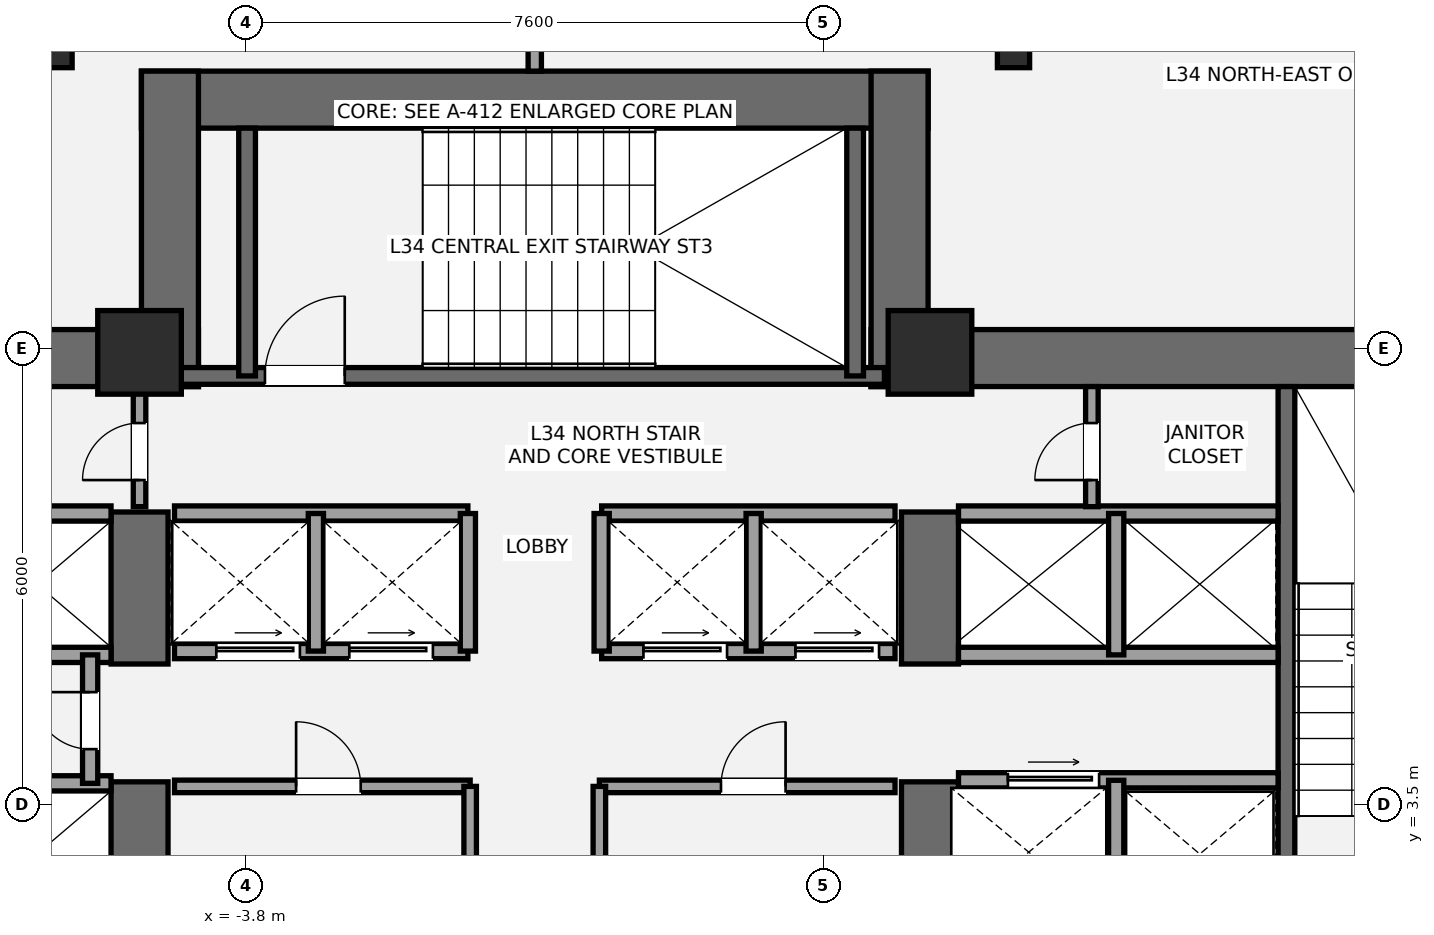
"""IFC4 building model, lengths in metres.
Left out: names, types, materials, properties, quantities, classifications, styles, units other than length and angle.
Written with IfcOpenShell. Run it as: python <this file> out.ifc"""

import sys

from ifc_helpers import new_model, si_unit, direction, frame, frame_2d, origin, origin_2d, place, context, subcontext, project, spatial, rectangle, i_section, extrude, element, fill, save


model = new_model("IFC4")
c1 = context("Model", 3, precision=1e-05, world=origin(), true_north=direction((0.0, 1.0)))
c2 = subcontext(c1, "Body", "Model", "MODEL_VIEW")
j1 = project(units=[si_unit("LENGTHUNIT", "METRE"), si_unit("PLANEANGLEUNIT", "RADIAN")], contexts=[c1])
p1 = place(None, origin())
s1 = spatial("IfcSite", under=j1, at=p1, CompositionType="ELEMENT")
p2 = place(p1, origin())
s2 = spatial("IfcBuilding", under=s1, at=p2, CompositionType="ELEMENT")
p3 = place(p2, frame((0.0, 0.0, 128.1)))
s3 = spatial("IfcBuildingStorey", under=s2, at=p3, CompositionType="ELEMENT", Elevation=128.1)
p4 = place(p3, frame((-13.9, 9.375, 0.0), z_axis=(0.0, 0.0, 1.0), x_axis=(1.0, 0.0, 0.0)))
e1 = element("IfcWall", 1, at=p4, inside=s3, PredefinedType="SHEAR", context=c2, shape_type="SweptSolid", body=[
    extrude(rectangle(XDim=9.475, YDim=0.75, at=frame_2d((4.737, 0.0))), origin(), (0.0, 0.0, 1.0), 3.5),
])
p5 = place(p3, frame((-5.2, 1.1, 0.0), z_axis=(0.0, 0.0, 1.0), x_axis=(0.0, 1.0, 0.0)))
e2 = element("IfcWall", 2, at=p5, inside=s3, PredefinedType="SHEAR", context=c2, shape_type="SweptSolid", body=[
    extrude(rectangle(XDim=2.7, YDim=0.75, at=frame_2d((1.35, 0.0))), origin(), (0.0, 0.0, 1.0), 3.5),
])
p6 = place(p3, frame((-5.2, 5.35, 0.0), z_axis=(0.0, 0.0, 1.0), x_axis=(0.0, 1.0, 0.0)))
e3 = element("IfcWall", 3, at=p6, inside=s3, PredefinedType="SHEAR", context=c2, shape_type="SweptSolid", body=[
    extrude(rectangle(XDim=2.0, YDim=0.75, at=frame_2d((1.0, 0.0))), origin(), (0.0, 0.0, 1.0), 3.5),
])
p7 = place(p3, frame((4.425, 9.375, 0.0), z_axis=(0.0, 0.0, 1.0), x_axis=(1.0, 0.0, 0.0)))
e4 = element("IfcWall", 4, at=p7, inside=s3, PredefinedType="SHEAR", context=c2, shape_type="SweptSolid", body=[
    extrude(rectangle(XDim=9.475, YDim=0.75, at=frame_2d((4.737, 0.0))), origin(), (0.0, 0.0, 1.0), 3.5),
])
p8 = place(p3, frame((5.2, 1.1, 0.0), z_axis=(0.0, 0.0, 1.0), x_axis=(0.0, 1.0, 0.0)))
e5 = element("IfcWall", 5, at=p8, inside=s3, PredefinedType="SHEAR", context=c2, shape_type="SweptSolid", body=[
    extrude(rectangle(XDim=2.7, YDim=0.75, at=frame_2d((1.35, 0.0))), origin(), (0.0, 0.0, 1.0), 3.5),
])
p9 = place(p3, frame((5.2, 5.35, 0.0), z_axis=(0.0, 0.0, 1.0), x_axis=(0.0, 1.0, 0.0)))
e6 = element("IfcWall", 6, at=p9, inside=s3, PredefinedType="SHEAR", context=c2, shape_type="SweptSolid", body=[
    extrude(rectangle(XDim=2.0, YDim=0.75, at=frame_2d((1.0, 0.0))), origin(), (0.0, 0.0, 1.0), 3.5),
])
p10 = place(p3, frame((9.89, 1.85, 0.0), z_axis=(0.0, 0.0, 1.0), x_axis=(0.0, 1.0, 0.0)))
e7 = element("IfcWall", 7, at=p10, inside=s3, PredefinedType="SHEAR", context=c2, shape_type="SweptSolid", body=[
    extrude(rectangle(XDim=7.15, YDim=0.22, at=frame_2d((3.575, 0.0))), origin(), (0.0, 0.0, 1.0), 3.5),
])
p11 = place(p3, frame((-5.175, 12.775, 0.0), z_axis=(0.0, 0.0, 1.0), x_axis=(1.0, 0.0, 0.0)))
e8 = element("IfcWall", 8, at=p11, inside=s3, PredefinedType="SHEAR", context=c2, shape_type="SweptSolid", body=[
    extrude(rectangle(XDim=10.35, YDim=0.75, at=frame_2d((5.175, 0.0))), origin(), (0.0, 0.0, 1.0), 3.5),
])
for number, where, z_axis, x_axis in (
    (9, (-4.8, 9.0, 0.0), (0.0, 0.0, 1.0), (0.0, 1.0, 0.0)),
    (10, (4.8, 9.0, 0.0), (0.0, 0.0, 1.0), (0.0, 1.0, 0.0)),
):
    element("IfcWall", number, at=place(p3, frame(where, z_axis=z_axis, x_axis=x_axis)), inside=s3, PredefinedType="SHEAR", context=c2, shape_type="SweptSolid", body=[
        extrude(rectangle(XDim=4.15, YDim=0.75, at=frame_2d((2.075, 0.0))), origin(), (0.0, 0.0, 1.0), 3.5),
    ])
p12 = place(p3, frame((-4.7, 9.14, 0.0), z_axis=(0.0, 0.0, 1.0), x_axis=(1.0, 0.0, 0.0)))
e11 = element("IfcWall", 11, at=p12, inside=s3, PredefinedType="SHEAR", context=c2, shape_type="SweptSolid", body=[
    extrude(rectangle(XDim=9.3, YDim=0.22, at=frame_2d((4.65, 0.0))), origin(), (0.0, 0.0, 1.0), 3.5),
])
p13 = place(p12, frame((1.15, 0.0, 0.0)))
e12 = element("IfcOpeningElement", 12, at=p13, cuts=e11, PredefinedType="OPENING", context=c2, shape_type="SweptSolid", body=[
    extrude(rectangle(XDim=1.05, YDim=2.15, at=frame_2d((0.525, 1.075))), frame((0.0, 0.12, 0.0), z_axis=(0.0, -1.0, 0.0), x_axis=(1.0, 0.0, 0.0)), (0.0, 0.0, 1.0), 0.24),
])
for number, where, z_axis, x_axis in (
    (13, (-3.785, 9.14, 0.0), (0.0, 0.0, 1.0), (0.0, 1.0, 0.0)),
    (14, (4.215, 9.14, 0.0), (0.0, 0.0, 1.0), (0.0, 1.0, 0.0)),
):
    element("IfcWall", number, at=place(p3, frame(where, z_axis=z_axis, x_axis=x_axis)), inside=s3, PredefinedType="SHEAR", context=c2, shape_type="SweptSolid", body=[
        extrude(rectangle(XDim=3.26, YDim=0.22, at=frame_2d((1.63, 0.0))), origin(), (0.0, 0.0, 1.0), 3.5),
    ])
for number, where, z_axis, x_axis in (
    (15, (-5.2, 9.45, 0.0), (0.0, 0.0, 1.0), (1.0, 0.0, 0.0)),
    (16, (5.2, 9.45, 0.0), (0.0, 0.0, 1.0), (1.0, 0.0, 0.0)),
):
    element("IfcColumn", number, at=place(p3, frame(where, z_axis=z_axis, x_axis=x_axis)), inside=s3, PredefinedType="COLUMN", context=c2, shape_type="SweptSolid", body=[
        extrude(rectangle(XDim=1.1, YDim=1.1, at=origin_2d()), origin(), (0.0, 0.0, 1.0), 3.5),
    ])
for number, where, z_axis, x_axis in (
    (17, (6.299, 13.433, 0.0), (0.0, 0.0, 1.0), (1.0, 0.0, 0.0)),
    (18, (-6.299, 13.433, 0.0), (0.0, 0.0, 1.0), (1.0, 0.0, 0.0)),
):
    element("IfcColumn", number, at=place(p3, frame(where, z_axis=z_axis, x_axis=x_axis)), inside=s3, PredefinedType="COLUMN", context=c2, shape_type="SweptSolid", body=[
        extrude(i_section(OverallWidth=0.424, OverallDepth=0.474, WebThickness=0.048, FlangeThickness=0.077, at=origin_2d()), origin(), (0.0, 0.0, 1.0), 3.5),
    ])
for number, where, z_axis, x_axis in (
    (19, (-9.78, 3.78, 0.0), (0.0, 0.0, 1.0), (1.0, 0.0, 0.0)),
    (20, (-9.78, 5.47, 0.0), (0.0, 0.0, 1.0), (1.0, 0.0, 0.0)),
    (21, (-9.78, 7.33, 0.0), (0.0, 0.0, 1.0), (1.0, 0.0, 0.0)),
):
    element("IfcWall", number, at=place(p3, frame(where, z_axis=z_axis, x_axis=x_axis)), inside=s3, PredefinedType="SOLIDWALL", context=c2, shape_type="SweptSolid", body=[
        extrude(rectangle(XDim=4.205, YDim=0.2, at=frame_2d((2.103, 0.0))), origin(), (0.0, 0.0, 1.0), 3.31),
    ])
p14 = place(p3, frame((-5.85, 3.78, 0.0), z_axis=(0.0, 0.0, 1.0), x_axis=(0.0, 1.0, 0.0)))
e22 = element("IfcWall", 22, at=p14, inside=s3, PredefinedType="SOLIDWALL", context=c2, shape_type="SweptSolid", body=[
    extrude(rectangle(XDim=1.69, YDim=0.2, at=frame_2d((0.845, 0.0))), origin(), (0.0, 0.0, 1.0), 3.31),
])
p15 = place(p14, frame((0.45, 0.0, 0.0)))
e23 = element("IfcOpeningElement", 23, at=p15, cuts=e22, PredefinedType="OPENING", context=c2, shape_type="SweptSolid", body=[
    extrude(rectangle(XDim=0.75, YDim=2.1, at=frame_2d((0.375, 1.05))), frame((0.0, 0.11, 0.0), z_axis=(0.0, -1.0, 0.0), x_axis=(1.0, 0.0, 0.0)), (0.0, 0.0, 1.0), 0.22),
])
p16 = place(p3, frame((5.575, 3.82, 0.0), z_axis=(0.0, 0.0, 1.0), x_axis=(1.0, 0.0, 0.0)))
e24 = element("IfcWall", 24, at=p16, inside=s3, PredefinedType="SOLIDWALL", context=c2, shape_type="SweptSolid", body=[
    extrude(rectangle(XDim=4.205, YDim=0.2, at=frame_2d((2.103, 0.0))), origin(), (0.0, 0.0, 1.0), 3.31),
])
p17 = place(p16, frame((0.65, 0.0, 0.0)))
e25 = element("IfcOpeningElement", 25, at=p17, cuts=e24, PredefinedType="OPENING", context=c2, shape_type="SweptSolid", body=[
    extrude(rectangle(XDim=1.2, YDim=2.2, at=frame_2d((0.6, 1.1))), frame((0.0, 0.11, 0.0), z_axis=(0.0, -1.0, 0.0), x_axis=(1.0, 0.0, 0.0)), (0.0, 0.0, 1.0), 0.22),
])
p18 = place(p3, frame((7.65, 1.85, 0.0), z_axis=(0.0, 0.0, 1.0), x_axis=(0.0, 1.0, 0.0)))
e26 = element("IfcWall", 26, at=p18, inside=s3, PredefinedType="SOLIDWALL", context=c2, shape_type="SweptSolid", body=[
    extrude(rectangle(XDim=1.97, YDim=0.2, at=frame_2d((0.985, 0.0))), origin(), (0.0, 0.0, 1.0), 3.31),
])
for number, where, z_axis, x_axis in (
    (27, (5.575, 5.47, 0.0), (0.0, 0.0, 1.0), (1.0, 0.0, 0.0)),
    (28, (5.575, 7.33, 0.0), (0.0, 0.0, 1.0), (1.0, 0.0, 0.0)),
):
    element("IfcWall", number, at=place(p3, frame(where, z_axis=z_axis, x_axis=x_axis)), inside=s3, PredefinedType="SOLIDWALL", context=c2, shape_type="SweptSolid", body=[
        extrude(rectangle(XDim=4.205, YDim=0.2, at=frame_2d((2.103, 0.0))), origin(), (0.0, 0.0, 1.0), 3.31),
    ])
p19 = place(p3, frame((7.65, 5.47, 0.0), z_axis=(0.0, 0.0, 1.0), x_axis=(0.0, 1.0, 0.0)))
e29 = element("IfcWall", 29, at=p19, inside=s3, PredefinedType="SOLIDWALL", context=c2, shape_type="SweptSolid", body=[
    extrude(rectangle(XDim=1.86, YDim=0.2, at=frame_2d((0.93, 0.0))), origin(), (0.0, 0.0, 1.0), 3.31),
])
p20 = place(p3, frame((-4.74, 3.74, 0.0), z_axis=(0.0, 0.0, 1.0), x_axis=(1.0, 0.0, 0.0)))
e30 = element("IfcWall", 30, at=p20, inside=s3, PredefinedType="PARTITIONING", context=c2, shape_type="SweptSolid", body=[
    extrude(rectangle(XDim=3.89, YDim=0.165, at=frame_2d((1.945, 0.0))), origin(), (0.0, 0.0, 1.0), 3.31),
])
p21 = place(p20, frame((1.6, 0.0, 0.0)))
e31 = element("IfcOpeningElement", 31, at=p21, cuts=e30, PredefinedType="OPENING", context=c2, shape_type="SweptSolid", body=[
    extrude(rectangle(XDim=0.85, YDim=2.1, at=frame_2d((0.425, 1.05))), frame((0.0, 0.093, 0.0), z_axis=(0.0, -1.0, 0.0), x_axis=(1.0, 0.0, 0.0)), (0.0, 0.0, 1.0), 0.185),
])
p22 = place(p3, frame((-0.85, 1.92, 0.0), z_axis=(0.0, 0.0, 1.0), x_axis=(0.0, 1.0, 0.0)))
e32 = element("IfcWall", 32, at=p22, inside=s3, PredefinedType="PARTITIONING", context=c2, shape_type="SweptSolid", body=[
    extrude(rectangle(XDim=1.82, YDim=0.165, at=frame_2d((0.91, 0.0))), origin(), (0.0, 0.0, 1.0), 3.31),
])
p23 = place(p3, frame((0.85, 3.74, 0.0), z_axis=(0.0, 0.0, 1.0), x_axis=(1.0, 0.0, 0.0)))
e33 = element("IfcWall", 33, at=p23, inside=s3, PredefinedType="PARTITIONING", context=c2, shape_type="SweptSolid", body=[
    extrude(rectangle(XDim=3.89, YDim=0.165, at=frame_2d((1.945, 0.0))), origin(), (0.0, 0.0, 1.0), 3.31),
])
p24 = place(p23, frame((1.6, 0.0, 0.0)))
e34 = element("IfcOpeningElement", 34, at=p24, cuts=e33, PredefinedType="OPENING", context=c2, shape_type="SweptSolid", body=[
    extrude(rectangle(XDim=0.85, YDim=2.1, at=frame_2d((0.425, 1.05))), frame((0.0, 0.093, 0.0), z_axis=(0.0, -1.0, 0.0), x_axis=(1.0, 0.0, 0.0)), (0.0, 0.0, 1.0), 0.185),
])
p25 = place(p3, frame((0.85, 1.92, 0.0), z_axis=(0.0, 0.0, 1.0), x_axis=(0.0, 1.0, 0.0)))
e35 = element("IfcWall", 35, at=p25, inside=s3, PredefinedType="PARTITIONING", context=c2, shape_type="SweptSolid", body=[
    extrude(rectangle(XDim=1.82, YDim=0.165, at=frame_2d((0.91, 0.0))), origin(), (0.0, 0.0, 1.0), 3.31),
])
p26 = place(p3, frame((-4.74, 5.52, 0.0), z_axis=(0.0, 0.0, 1.0), x_axis=(1.0, 0.0, 0.0)))
e36 = element("IfcWall", 36, at=p26, inside=s3, PredefinedType="SOLIDWALL", context=c2, shape_type="SweptSolid", body=[
    extrude(rectangle(XDim=3.86, YDim=0.2, at=frame_2d((1.93, 0.0))), origin(), (0.0, 0.0, 1.0), 3.31),
])
p27 = place(p26, frame((0.55, 0.0, 0.0)))
e37 = element("IfcOpeningElement", 37, at=p27, cuts=e36, PredefinedType="OPENING", context=c2, shape_type="SweptSolid", body=[
    extrude(rectangle(XDim=1.1, YDim=2.2, at=frame_2d((0.55, 1.1))), frame((0.0, 0.11, 0.0), z_axis=(0.0, -1.0, 0.0), x_axis=(1.0, 0.0, 0.0)), (0.0, 0.0, 1.0), 0.22),
])
p28 = place(p26, frame((2.3, 0.0, 0.0)))
e38 = element("IfcOpeningElement", 38, at=p28, cuts=e36, PredefinedType="OPENING", context=c2, shape_type="SweptSolid", body=[
    extrude(rectangle(XDim=1.1, YDim=2.2, at=frame_2d((0.55, 1.1))), frame((0.0, 0.11, 0.0), z_axis=(0.0, -1.0, 0.0), x_axis=(1.0, 0.0, 0.0)), (0.0, 0.0, 1.0), 0.22),
])
p29 = place(p3, frame((0.88, 5.52, 0.0), z_axis=(0.0, 0.0, 1.0), x_axis=(1.0, 0.0, 0.0)))
e39 = element("IfcWall", 39, at=p29, inside=s3, PredefinedType="SOLIDWALL", context=c2, shape_type="SweptSolid", body=[
    extrude(rectangle(XDim=3.86, YDim=0.2, at=frame_2d((1.93, 0.0))), origin(), (0.0, 0.0, 1.0), 3.31),
])
p30 = place(p29, frame((0.55, 0.0, 0.0)))
e40 = element("IfcOpeningElement", 40, at=p30, cuts=e39, PredefinedType="OPENING", context=c2, shape_type="SweptSolid", body=[
    extrude(rectangle(XDim=1.1, YDim=2.2, at=frame_2d((0.55, 1.1))), frame((0.0, 0.11, 0.0), z_axis=(0.0, -1.0, 0.0), x_axis=(1.0, 0.0, 0.0)), (0.0, 0.0, 1.0), 0.22),
])
p31 = place(p29, frame((2.55, 0.0, 0.0)))
e41 = element("IfcOpeningElement", 41, at=p31, cuts=e39, PredefinedType="OPENING", context=c2, shape_type="SweptSolid", body=[
    extrude(rectangle(XDim=1.1, YDim=2.2, at=frame_2d((0.55, 1.1))), frame((0.0, 0.11, 0.0), z_axis=(0.0, -1.0, 0.0), x_axis=(1.0, 0.0, 0.0)), (0.0, 0.0, 1.0), 0.22),
])
for number, where, z_axis, x_axis in (
    (42, (-4.74, 7.33, 0.0), (0.0, 0.0, 1.0), (1.0, 0.0, 0.0)),
    (43, (0.88, 7.33, 0.0), (0.0, 0.0, 1.0), (1.0, 0.0, 0.0)),
):
    element("IfcWall", number, at=place(p3, frame(where, z_axis=z_axis, x_axis=x_axis)), inside=s3, PredefinedType="SOLIDWALL", context=c2, shape_type="SweptSolid", body=[
        extrude(rectangle(XDim=3.86, YDim=0.2, at=frame_2d((1.93, 0.0))), origin(), (0.0, 0.0, 1.0), 3.31),
    ])
for number, where, z_axis, x_axis in (
    (44, (-2.88, 5.52, 0.0), (0.0, 0.0, 1.0), (0.0, 1.0, 0.0)),
    (45, (2.88, 5.52, 0.0), (0.0, 0.0, 1.0), (0.0, 1.0, 0.0)),
    (46, (-0.88, 5.52, 0.0), (0.0, 0.0, 1.0), (0.0, 1.0, 0.0)),
    (47, (0.88, 5.52, 0.0), (0.0, 0.0, 1.0), (0.0, 1.0, 0.0)),
):
    element("IfcWall", number, at=place(p3, frame(where, z_axis=z_axis, x_axis=x_axis)), inside=s3, PredefinedType="SOLIDWALL", context=c2, shape_type="SweptSolid", body=[
        extrude(rectangle(XDim=1.81, YDim=0.2, at=frame_2d((0.905, 0.0))), origin(), (0.0, 0.0, 1.0), 3.31),
    ])
p32 = place(p3, frame((-5.2, 7.42, 0.0), z_axis=(0.0, 0.0, 1.0), x_axis=(0.0, 1.0, 0.0)))
e48 = element("IfcWall", 48, at=p32, inside=s3, PredefinedType="PARTITIONING", context=c2, shape_type="SweptSolid", body=[
    extrude(rectangle(XDim=1.58, YDim=0.165, at=frame_2d((0.79, 0.0))), origin(), (0.0, 0.0, 1.0), 3.31),
])
p33 = place(p32, frame((0.35, 0.0, 0.0)))
e49 = element("IfcOpeningElement", 49, at=p33, cuts=e48, PredefinedType="OPENING", context=c2, shape_type="SweptSolid", body=[
    extrude(rectangle(XDim=0.75, YDim=2.1, at=frame_2d((0.375, 1.05))), frame((0.0, 0.093, 0.0), z_axis=(0.0, -1.0, 0.0), x_axis=(1.0, 0.0, 0.0)), (0.0, 0.0, 1.0), 0.185),
])
p34 = place(p3, frame((7.33, 7.42, 0.0), z_axis=(0.0, 0.0, 1.0), x_axis=(0.0, 1.0, 0.0)))
e50 = element("IfcWall", 50, at=p34, inside=s3, PredefinedType="PARTITIONING", context=c2, shape_type="SweptSolid", body=[
    extrude(rectangle(XDim=1.58, YDim=0.165, at=frame_2d((0.79, 0.0))), origin(), (0.0, 0.0, 1.0), 3.31),
])
p35 = place(p34, frame((0.35, 0.0, 0.0)))
e51 = element("IfcOpeningElement", 51, at=p35, cuts=e50, PredefinedType="OPENING", context=c2, shape_type="SweptSolid", body=[
    extrude(rectangle(XDim=0.75, YDim=2.1, at=frame_2d((0.375, 1.05))), frame((0.0, 0.093, 0.0), z_axis=(0.0, -1.0, 0.0), x_axis=(1.0, 0.0, 0.0)), (0.0, 0.0, 1.0), 0.185),
])
p36 = place(p3, frame((0.0, 13.15, 0.0), z_axis=(0.0, 0.0, 1.0), x_axis=(0.0, 1.0, 0.0)))
e52 = element("IfcWall", 52, at=p36, inside=s3, PredefinedType="PARTITIONING", context=c2, shape_type="SweptSolid", body=[
    extrude(rectangle(XDim=3.777, YDim=0.175, at=frame_2d((1.889, 0.0))), origin(), (0.0, 0.0, 1.0), 3.31),
])
p37 = place(p13, origin())
e53 = element("IfcDoor", 53, at=p37, inside=s3, OperationType="SINGLE_SWING_RIGHT", PredefinedType="DOOR", context=c2, shape_type="SweptSolid", body=[
    extrude(rectangle(XDim=1.05, YDim=2.15, at=frame_2d((0.525, 1.075))), frame((0.0, 0.025, 0.0), z_axis=(0.0, -1.0, 0.0), x_axis=(1.0, 0.0, 0.0)), (0.0, 0.0, 1.0), 0.05),
])
fill(e12, e53)
p38 = place(p15, origin())
e54 = element("IfcDoor", 54, at=p38, inside=s3, OperationType="SINGLE_SWING_RIGHT", PredefinedType="DOOR", context=c2, shape_type="SweptSolid", body=[
    extrude(rectangle(XDim=0.75, YDim=2.1, at=frame_2d((0.375, 1.05))), frame((0.0, 0.025, 0.0), z_axis=(0.0, -1.0, 0.0), x_axis=(1.0, 0.0, 0.0)), (0.0, 0.0, 1.0), 0.05),
])
fill(e23, e54)
p39 = place(p17, origin())
e55 = element("IfcDoor", 55, at=p39, inside=s3, OperationType="SLIDING_TO_RIGHT", PredefinedType="DOOR", context=c2, shape_type="SweptSolid", body=[
    extrude(rectangle(XDim=1.2, YDim=2.2, at=frame_2d((0.6, 1.1))), frame((0.0, 0.025, 0.0), z_axis=(0.0, -1.0, 0.0), x_axis=(1.0, 0.0, 0.0)), (0.0, 0.0, 1.0), 0.05),
])
fill(e25, e55)
p40 = place(p21, origin())
e56 = element("IfcDoor", 56, at=p40, inside=s3, OperationType="SINGLE_SWING_LEFT", PredefinedType="DOOR", context=c2, shape_type="SweptSolid", body=[
    extrude(rectangle(XDim=0.85, YDim=2.1, at=frame_2d((0.425, 1.05))), frame((0.0, 0.025, 0.0), z_axis=(0.0, -1.0, 0.0), x_axis=(1.0, 0.0, 0.0)), (0.0, 0.0, 1.0), 0.05),
])
fill(e31, e56)
p41 = place(p24, origin())
e57 = element("IfcDoor", 57, at=p41, inside=s3, OperationType="SINGLE_SWING_RIGHT", PredefinedType="DOOR", context=c2, shape_type="SweptSolid", body=[
    extrude(rectangle(XDim=0.85, YDim=2.1, at=frame_2d((0.425, 1.05))), frame((0.0, 0.025, 0.0), z_axis=(0.0, -1.0, 0.0), x_axis=(1.0, 0.0, 0.0)), (0.0, 0.0, 1.0), 0.05),
])
fill(e34, e57)
p42 = place(p27, origin())
e58 = element("IfcDoor", 58, at=p42, inside=s3, OperationType="SLIDING_TO_LEFT", PredefinedType="DOOR", context=c2, shape_type="SweptSolid", body=[
    extrude(rectangle(XDim=1.1, YDim=2.2, at=frame_2d((0.55, 1.1))), frame((0.0, 0.025, 0.0), z_axis=(0.0, -1.0, 0.0), x_axis=(1.0, 0.0, 0.0)), (0.0, 0.0, 1.0), 0.05),
])
fill(e37, e58)
p43 = place(p28, origin())
e59 = element("IfcDoor", 59, at=p43, inside=s3, OperationType="SLIDING_TO_LEFT", PredefinedType="DOOR", context=c2, shape_type="SweptSolid", body=[
    extrude(rectangle(XDim=1.1, YDim=2.2, at=frame_2d((0.55, 1.1))), frame((0.0, 0.025, 0.0), z_axis=(0.0, -1.0, 0.0), x_axis=(1.0, 0.0, 0.0)), (0.0, 0.0, 1.0), 0.05),
])
fill(e38, e59)
p44 = place(p30, origin())
e60 = element("IfcDoor", 60, at=p44, inside=s3, OperationType="SLIDING_TO_LEFT", PredefinedType="DOOR", context=c2, shape_type="SweptSolid", body=[
    extrude(rectangle(XDim=1.1, YDim=2.2, at=frame_2d((0.55, 1.1))), frame((0.0, 0.025, 0.0), z_axis=(0.0, -1.0, 0.0), x_axis=(1.0, 0.0, 0.0)), (0.0, 0.0, 1.0), 0.05),
])
fill(e40, e60)
p45 = place(p31, origin())
e61 = element("IfcDoor", 61, at=p45, inside=s3, OperationType="SLIDING_TO_LEFT", PredefinedType="DOOR", context=c2, shape_type="SweptSolid", body=[
    extrude(rectangle(XDim=1.1, YDim=2.2, at=frame_2d((0.55, 1.1))), frame((0.0, 0.025, 0.0), z_axis=(0.0, -1.0, 0.0), x_axis=(1.0, 0.0, 0.0)), (0.0, 0.0, 1.0), 0.05),
])
fill(e41, e61)
p46 = place(p33, origin())
e62 = element("IfcDoor", 62, at=p46, inside=s3, OperationType="SINGLE_SWING_LEFT", PredefinedType="DOOR", context=c2, shape_type="SweptSolid", body=[
    extrude(rectangle(XDim=0.75, YDim=2.1, at=frame_2d((0.375, 1.05))), frame((0.0, 0.025, 0.0), z_axis=(0.0, -1.0, 0.0), x_axis=(1.0, 0.0, 0.0)), (0.0, 0.0, 1.0), 0.05),
])
fill(e49, e62)
p47 = place(p35, origin())
e63 = element("IfcDoor", 63, at=p47, inside=s3, OperationType="SINGLE_SWING_LEFT", PredefinedType="DOOR", context=c2, shape_type="SweptSolid", body=[
    extrude(rectangle(XDim=0.75, YDim=2.1, at=frame_2d((0.375, 1.05))), frame((0.0, 0.025, 0.0), z_axis=(0.0, -1.0, 0.0), x_axis=(1.0, 0.0, 0.0)), (0.0, 0.0, 1.0), 0.05),
])
fill(e51, e63)
save(model, sys.argv[1])
